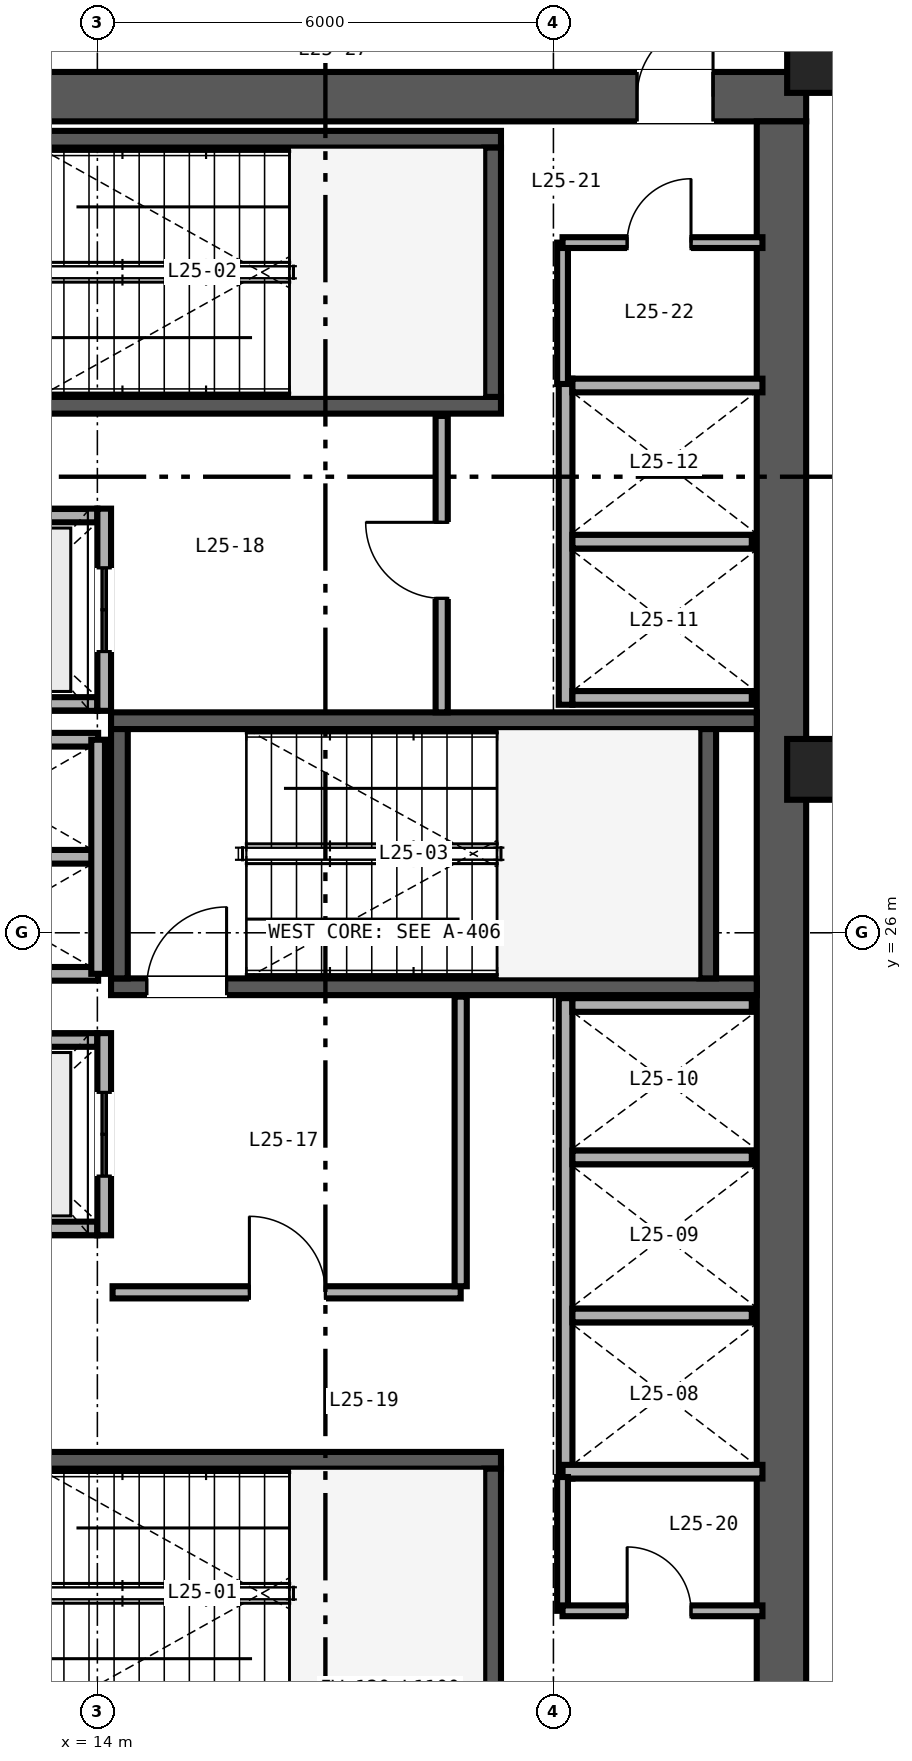
"""IFC4 building model, lengths in metres.
Left out: names, types, materials, properties, quantities, classifications, styles, units other than length and angle.
Written with IfcOpenShell. Run it as: python <this file> out.ifc"""

import sys

from ifc_helpers import new_model, si_unit, direction, frame, frame_2d, origin, origin_2d, place, context, subcontext, project, spatial, rectangle, hollow_rectangle, extrude, source, transform, mapped, element, fill, save


model = new_model("IFC4")
c1 = context("Model", 3, precision=1e-05, world=origin(), true_north=direction((0.0, 1.0)))
c2 = subcontext(c1, "Body", "Model", "MODEL_VIEW")
j1 = project(units=[si_unit("LENGTHUNIT", "METRE"), si_unit("PLANEANGLEUNIT", "RADIAN")], contexts=[c1])
p1 = place(None, origin())
s1 = spatial("IfcSite", under=j1, at=p1, CompositionType="ELEMENT")
p2 = place(p1, origin())
s2 = spatial("IfcBuilding", under=s1, at=p2, CompositionType="ELEMENT")
p3 = place(p2, frame((0.0, 0.0, 104.4)))
s3 = spatial("IfcBuildingStorey", under=s2, at=p3, CompositionType="ELEMENT", Elevation=104.4)
p4 = place(p3, frame((10.675, 37.0, 0.0), z_axis=(0.0, 0.0, 1.0), x_axis=(1.0, 0.0, 0.0)))
e1 = element("IfcWall", 1, at=p4, inside=s3, PredefinedType="SHEAR", context=c2, shape_type="SweptSolid", body=[
    extrude(rectangle(XDim=12.65, YDim=0.65, at=frame_2d((6.325, 0.0))), origin(), (0.0, 0.0, 1.0), 3.36),
])
p5 = place(p4, frame((10.425, 0.0, 0.0)))
e2 = element("IfcOpeningElement", 2, at=p5, cuts=e1, PredefinedType="OPENING", context=c2, shape_type="SweptSolid", body=[
    extrude(rectangle(XDim=1.0, YDim=2.15, at=frame_2d((0.5, 1.075))), frame((0.0, 0.335, 0.0), z_axis=(0.0, -1.0, 0.0), x_axis=(1.0, 0.0, 0.0)), (0.0, 0.0, 1.0), 0.67),
])
p6 = place(p3, frame((23.0, 15.325, 0.0), z_axis=(0.0, 0.0, 1.0), x_axis=(0.0, 1.0, 0.0)))
e3 = element("IfcWall", 3, at=p6, inside=s3, PredefinedType="SHEAR", context=c2, shape_type="SweptSolid", body=[
    extrude(rectangle(XDim=21.35, YDim=0.65, at=frame_2d((10.675, 0.0))), origin(), (0.0, 0.0, 1.0), 3.36),
])
p7 = place(p3, frame((11.325, 19.06, 0.0), z_axis=(0.0, 0.0, 1.0), x_axis=(1.0, 0.0, 0.0)))
e4 = element("IfcWall", 4, at=p7, inside=s3, PredefinedType="SHEAR", context=c2, shape_type="SweptSolid", body=[
    extrude(rectangle(XDim=7.985, YDim=0.22, at=frame_2d((3.993, 0.0))), origin(), (0.0, 0.0, 1.0), 3.4),
])
p8 = place(p7, frame((0.595, 0.0, 0.0)))
e5 = element("IfcOpeningElement", 5, at=p8, cuts=e4, PredefinedType="OPENING", context=c2, shape_type="SweptSolid", body=[
    extrude(rectangle(XDim=1.05, YDim=2.15, at=frame_2d((0.525, 1.075))), frame((0.0, 0.12, 0.0), z_axis=(0.0, -1.0, 0.0), x_axis=(1.0, 0.0, 0.0)), (0.0, 0.0, 1.0), 0.24),
])
p9 = place(p3, frame((19.2, 15.67, 0.0), z_axis=(0.0, 0.0, 1.0), x_axis=(0.0, 1.0, 0.0)))
e6 = element("IfcWall", 6, at=p9, inside=s3, PredefinedType="SHEAR", context=c2, shape_type="SweptSolid", body=[
    extrude(rectangle(XDim=3.28, YDim=0.22, at=frame_2d((1.64, 0.0))), origin(), (0.0, 0.0, 1.0), 3.4),
])
p10 = place(p3, frame((11.325, 32.94, 0.0), z_axis=(0.0, 0.0, 1.0), x_axis=(1.0, 0.0, 0.0)))
e7 = element("IfcWall", 7, at=p10, inside=s3, PredefinedType="SHEAR", context=c2, shape_type="SweptSolid", body=[
    extrude(rectangle(XDim=7.985, YDim=0.22, at=frame_2d((3.993, 0.0))), origin(), (0.0, 0.0, 1.0), 3.4),
])
p11 = place(p10, frame((0.595, 0.0, 0.0)))
e8 = element("IfcOpeningElement", 8, at=p11, cuts=e7, PredefinedType="OPENING", context=c2, shape_type="SweptSolid", body=[
    extrude(rectangle(XDim=1.05, YDim=2.15, at=frame_2d((0.525, 1.075))), frame((0.0, 0.12, 0.0), z_axis=(0.0, -1.0, 0.0), x_axis=(1.0, 0.0, 0.0)), (0.0, 0.0, 1.0), 0.24),
])
p12 = place(p3, frame((11.325, 36.44, 0.0), z_axis=(0.0, 0.0, 1.0), x_axis=(1.0, 0.0, 0.0)))
e9 = element("IfcWall", 9, at=p12, inside=s3, PredefinedType="SHEAR", context=c2, shape_type="SweptSolid", body=[
    extrude(rectangle(XDim=7.985, YDim=0.22, at=frame_2d((3.993, 0.0))), origin(), (0.0, 0.0, 1.0), 3.4),
])
p13 = place(p3, frame((19.2, 33.05, 0.0), z_axis=(0.0, 0.0, 1.0), x_axis=(0.0, 1.0, 0.0)))
e10 = element("IfcWall", 10, at=p13, inside=s3, PredefinedType="SHEAR", context=c2, shape_type="SweptSolid", body=[
    extrude(rectangle(XDim=3.28, YDim=0.22, at=frame_2d((1.64, 0.0))), origin(), (0.0, 0.0, 1.0), 3.4),
])
p14 = place(p3, frame((14.18, 25.29, 0.0), z_axis=(0.0, 0.0, 1.0), x_axis=(1.0, 0.0, 0.0)))
e11 = element("IfcWall", 11, at=p14, inside=s3, PredefinedType="SHEAR", context=c2, shape_type="SweptSolid", body=[
    extrude(rectangle(XDim=8.495, YDim=0.22, at=frame_2d((4.248, 0.0))), origin(), (0.0, 0.0, 1.0), 3.4),
])
p15 = place(p14, frame((0.47, 0.0, 0.0)))
e12 = element("IfcOpeningElement", 12, at=p15, cuts=e11, PredefinedType="OPENING", context=c2, shape_type="SweptSolid", body=[
    extrude(rectangle(XDim=1.05, YDim=2.15, at=frame_2d((0.525, 1.075))), frame((0.0, 0.12, 0.0), z_axis=(0.0, -1.0, 0.0), x_axis=(1.0, 0.0, 0.0)), (0.0, 0.0, 1.0), 0.24),
])
p16 = place(p3, frame((14.18, 28.79, 0.0), z_axis=(0.0, 0.0, 1.0), x_axis=(1.0, 0.0, 0.0)))
e13 = element("IfcWall", 13, at=p16, inside=s3, PredefinedType="SHEAR", context=c2, shape_type="SweptSolid", body=[
    extrude(rectangle(XDim=8.495, YDim=0.22, at=frame_2d((4.248, 0.0))), origin(), (0.0, 0.0, 1.0), 3.4),
])
for number, where, z_axis, x_axis in (
    (14, (14.29, 25.4, 0.0), (0.0, 0.0, 1.0), (0.0, 1.0, 0.0)),
    (15, (22.03, 25.4, 0.0), (0.0, 0.0, 1.0), (0.0, 1.0, 0.0)),
):
    element("IfcWall", number, at=place(p3, frame(where, z_axis=z_axis, x_axis=x_axis)), inside=s3, PredefinedType="SHEAR", context=c2, shape_type="SweptSolid", body=[
        extrude(rectangle(XDim=3.28, YDim=0.22, at=frame_2d((1.64, 0.0))), origin(), (0.0, 0.0, 1.0), 3.4),
    ])
m1 = source(origin(), c2, "Body", "SweptSolid", [
    extrude(hollow_rectangle(XDim=0.85, YDim=0.8, WallThickness=0.032, at=origin_2d()), origin(), (0.0, 0.0, 1.0), 3.36),
])
for number, where, z_axis, x_axis in (
    (16, (23.5, 28.15, 0.0), (0.0, 0.0, 1.0), (1.0, 0.0, 0.0)),
    (17, (23.5, 37.45, 0.0), (0.0, 0.0, 1.0), (1.0, 0.0, 0.0)),
):
    element("IfcColumn", number, at=place(p3, frame(where, z_axis=z_axis, x_axis=x_axis)), inside=s3, PredefinedType="COLUMN", context=c2, shape_type="MappedRepresentation", body=[
        mapped(m1, transform((0.0, 0.0, 0.0), scale=1.0)),
    ])
p17 = place(p3, frame((20.16, 18.82, 0.0), z_axis=(0.0, 0.0, 1.0), x_axis=(0.0, 1.0, 0.0)))
e18 = element("IfcWall", 18, at=p17, inside=s3, PredefinedType="SOLIDWALL", context=c2, shape_type="SweptSolid", body=[
    extrude(rectangle(XDim=6.32, YDim=0.18, at=frame_2d((3.16, 0.0))), origin(), (0.0, 0.0, 1.0), 2.36),
])
p18 = place(p3, frame((20.12, 18.91, 0.0), z_axis=(0.0, 0.0, 1.0), x_axis=(1.0, 0.0, 0.0)))
e19 = element("IfcWall", 19, at=p18, inside=s3, PredefinedType="SOLIDWALL", context=c2, shape_type="SweptSolid", body=[
    extrude(rectangle(XDim=2.63, YDim=0.18, at=frame_2d((1.315, 0.0))), origin(), (0.0, 0.0, 1.0), 3.36),
])
p19 = place(p3, frame((20.25, 25.05, 0.0), z_axis=(0.0, 0.0, 1.0), x_axis=(1.0, 0.0, 0.0)))
e20 = element("IfcWall", 20, at=p19, inside=s3, PredefinedType="SOLIDWALL", context=c2, shape_type="SweptSolid", body=[
    extrude(rectangle(XDim=2.36, YDim=0.18, at=frame_2d((1.18, 0.0))), origin(), (0.0, 0.0, 1.0), 3.36),
])
p20 = place(p3, frame((20.25, 20.965, 0.0), z_axis=(0.0, 0.0, 1.0), x_axis=(1.0, 0.0, 0.0)))
e21 = element("IfcWall", 21, at=p20, inside=s3, PredefinedType="SOLIDWALL", context=c2, shape_type="SweptSolid", body=[
    extrude(rectangle(XDim=2.36, YDim=0.18, at=frame_2d((1.18, 0.0))), origin(), (0.0, 0.0, 1.0), 2.36),
])
p21 = place(p3, frame((20.25, 23.045, 0.0), z_axis=(0.0, 0.0, 1.0), x_axis=(1.0, 0.0, 0.0)))
e22 = element("IfcWall", 22, at=p21, inside=s3, PredefinedType="SOLIDWALL", context=c2, shape_type="SweptSolid", body=[
    extrude(rectangle(XDim=2.36, YDim=0.18, at=frame_2d((1.18, 0.0))), origin(), (0.0, 0.0, 1.0), 3.36),
])
p22 = place(p3, frame((20.16, 29.0, 0.0), z_axis=(0.0, 0.0, 1.0), x_axis=(0.0, 1.0, 0.0)))
e23 = element("IfcWall", 23, at=p22, inside=s3, PredefinedType="SOLIDWALL", context=c2, shape_type="SweptSolid", body=[
    extrude(rectangle(XDim=4.29, YDim=0.18, at=frame_2d((2.145, 0.0))), origin(), (0.0, 0.0, 1.0), 3.36),
])
p23 = place(p3, frame((20.25, 29.09, 0.0), z_axis=(0.0, 0.0, 1.0), x_axis=(1.0, 0.0, 0.0)))
e24 = element("IfcWall", 24, at=p23, inside=s3, PredefinedType="SOLIDWALL", context=c2, shape_type="SweptSolid", body=[
    extrude(rectangle(XDim=2.36, YDim=0.18, at=frame_2d((1.18, 0.0))), origin(), (0.0, 0.0, 1.0), 3.36),
])
p24 = place(p3, frame((20.25, 33.2, 0.0), z_axis=(0.0, 0.0, 1.0), x_axis=(1.0, 0.0, 0.0)))
e25 = element("IfcWall", 25, at=p24, inside=s3, PredefinedType="SOLIDWALL", context=c2, shape_type="SweptSolid", body=[
    extrude(rectangle(XDim=2.5, YDim=0.18, at=frame_2d((1.25, 0.0))), origin(), (0.0, 0.0, 1.0), 3.36),
])
p25 = place(p3, frame((20.25, 31.145, 0.0), z_axis=(0.0, 0.0, 1.0), x_axis=(1.0, 0.0, 0.0)))
e26 = element("IfcWall", 26, at=p25, inside=s3, PredefinedType="SOLIDWALL", context=c2, shape_type="SweptSolid", body=[
    extrude(rectangle(XDim=2.36, YDim=0.18, at=frame_2d((1.18, 0.0))), origin(), (0.0, 0.0, 1.0), 3.36),
])
for number, where, z_axis, x_axis in (
    (27, (11.5, 22.11, 0.0), (0.0, 0.0, 1.0), (1.0, 0.0, 0.0)),
    (28, (11.5, 24.59, 0.0), (0.0, 0.0, 1.0), (1.0, 0.0, 0.0)),
):
    element("IfcWall", number, at=place(p3, frame(where, z_axis=z_axis, x_axis=x_axis)), inside=s3, PredefinedType="SOLIDWALL", context=c2, shape_type="SweptSolid", body=[
        extrude(rectangle(XDim=2.5, YDim=0.18, at=frame_2d((1.25, 0.0))), origin(), (0.0, 0.0, 1.0), 3.36),
    ])
p26 = place(p3, frame((14.09, 22.02, 0.0), z_axis=(0.0, 0.0, 1.0), x_axis=(0.0, 1.0, 0.0)))
e29 = element("IfcWall", 29, at=p26, inside=s3, PredefinedType="SOLIDWALL", context=c2, shape_type="SweptSolid", body=[
    extrude(rectangle(XDim=2.66, YDim=0.18, at=frame_2d((1.33, 0.0))), origin(), (0.0, 0.0, 1.0), 3.36),
])
p27 = place(p26, frame((0.78, 0.0, 0.0)))
e30 = element("IfcOpeningElement", 30, at=p27, cuts=e29, PredefinedType="OPENING", context=c2, shape_type="SweptSolid", body=[
    extrude(rectangle(XDim=1.1, YDim=2.2, at=frame_2d((0.55, 1.1))), frame((0.0, 0.1, 0.0), z_axis=(0.0, -1.0, 0.0), x_axis=(1.0, 0.0, 0.0)), (0.0, 0.0, 1.0), 0.2),
])
for number, where, z_axis, x_axis in (
    (31, (11.5, 29.01, 0.0), (0.0, 0.0, 1.0), (1.0, 0.0, 0.0)),
    (32, (11.5, 31.49, 0.0), (0.0, 0.0, 1.0), (1.0, 0.0, 0.0)),
):
    element("IfcWall", number, at=place(p3, frame(where, z_axis=z_axis, x_axis=x_axis)), inside=s3, PredefinedType="SOLIDWALL", context=c2, shape_type="SweptSolid", body=[
        extrude(rectangle(XDim=2.5, YDim=0.18, at=frame_2d((1.25, 0.0))), origin(), (0.0, 0.0, 1.0), 3.36),
    ])
p28 = place(p3, frame((14.09, 28.92, 0.0), z_axis=(0.0, 0.0, 1.0), x_axis=(0.0, 1.0, 0.0)))
e33 = element("IfcWall", 33, at=p28, inside=s3, PredefinedType="SOLIDWALL", context=c2, shape_type="SweptSolid", body=[
    extrude(rectangle(XDim=2.66, YDim=0.18, at=frame_2d((1.33, 0.0))), origin(), (0.0, 0.0, 1.0), 3.36),
])
p29 = place(p28, frame((0.78, 0.0, 0.0)))
e34 = element("IfcOpeningElement", 34, at=p29, cuts=e33, PredefinedType="OPENING", context=c2, shape_type="SweptSolid", body=[
    extrude(rectangle(XDim=1.1, YDim=2.2, at=frame_2d((0.55, 1.1))), frame((0.0, 0.1, 0.0), z_axis=(0.0, -1.0, 0.0), x_axis=(1.0, 0.0, 0.0)), (0.0, 0.0, 1.0), 0.2),
])
for number, where, z_axis, x_axis in (
    (35, (11.5, 25.46, 0.0), (0.0, 0.0, 1.0), (1.0, 0.0, 0.0)),
    (36, (11.5, 27.0, 0.0), (0.0, 0.0, 1.0), (1.0, 0.0, 0.0)),
    (37, (11.5, 28.54, 0.0), (0.0, 0.0, 1.0), (1.0, 0.0, 0.0)),
):
    element("IfcWall", number, at=place(p3, frame(where, z_axis=z_axis, x_axis=x_axis)), inside=s3, PredefinedType="SOLIDWALL", context=c2, shape_type="SweptSolid", body=[
        extrude(rectangle(XDim=2.51, YDim=0.18, at=frame_2d((1.255, 0.0))), origin(), (0.0, 0.0, 1.0), 3.36),
    ])
p30 = place(p3, frame((14.01, 25.46, 0.0), z_axis=(0.0, 0.0, 1.0), x_axis=(0.0, 1.0, 0.0)))
e38 = element("IfcWall", 38, at=p30, inside=s3, PredefinedType="SOLIDWALL", context=c2, shape_type="SweptSolid", body=[
    extrude(rectangle(XDim=3.08, YDim=0.18, at=frame_2d((1.54, 0.0))), origin(), (0.0, 0.0, 1.0), 3.36),
])
p31 = place(p3, frame((14.2, 21.27, 0.0), z_axis=(0.0, 0.0, 1.0), x_axis=(1.0, 0.0, 0.0)))
e39 = element("IfcWall", 39, at=p31, inside=s3, PredefinedType="PARTITIONING", context=c2, shape_type="SweptSolid", body=[
    extrude(rectangle(XDim=4.58, YDim=0.16, at=frame_2d((2.29, 0.0))), origin(), (0.0, 0.0, 1.0), 3.36),
])
p32 = place(p31, frame((1.8, 0.0, 0.0)))
e40 = element("IfcOpeningElement", 40, at=p32, cuts=e39, PredefinedType="OPENING", context=c2, shape_type="SweptSolid", body=[
    extrude(rectangle(XDim=1.0, YDim=2.15, at=frame_2d((0.5, 1.075))), frame((0.0, 0.09, 0.0), z_axis=(0.0, -1.0, 0.0), x_axis=(1.0, 0.0, 0.0)), (0.0, 0.0, 1.0), 0.18),
])
p33 = place(p3, frame((18.78, 21.35, 0.0), z_axis=(0.0, 0.0, 1.0), x_axis=(0.0, 1.0, 0.0)))
e41 = element("IfcWall", 41, at=p33, inside=s3, PredefinedType="PARTITIONING", context=c2, shape_type="SweptSolid", body=[
    extrude(rectangle(XDim=3.81, YDim=0.16, at=frame_2d((1.905, 0.0))), origin(), (0.0, 0.0, 1.0), 3.36),
])
p34 = place(p3, frame((18.53, 28.9, 0.0), z_axis=(0.0, 0.0, 1.0), x_axis=(0.0, 1.0, 0.0)))
e42 = element("IfcWall", 42, at=p34, inside=s3, PredefinedType="PARTITIONING", context=c2, shape_type="SweptSolid", body=[
    extrude(rectangle(XDim=3.9, YDim=0.16, at=frame_2d((1.95, 0.0))), origin(), (0.0, 0.0, 1.0), 3.36),
])
p35 = place(p34, frame((1.5, 0.0, 0.0)))
e43 = element("IfcOpeningElement", 43, at=p35, cuts=e42, PredefinedType="OPENING", context=c2, shape_type="SweptSolid", body=[
    extrude(rectangle(XDim=1.0, YDim=2.15, at=frame_2d((0.5, 1.075))), frame((0.0, 0.09, 0.0), z_axis=(0.0, -1.0, 0.0), x_axis=(1.0, 0.0, 0.0)), (0.0, 0.0, 1.0), 0.18),
])
p36 = place(p3, frame((20.12, 17.08, 0.0), z_axis=(0.0, 0.0, 1.0), x_axis=(0.0, 1.0, 0.0)))
e44 = element("IfcWall", 44, at=p36, inside=s3, PredefinedType="PARTITIONING", context=c2, shape_type="SweptSolid", body=[
    extrude(rectangle(XDim=1.76, YDim=0.142, at=frame_2d((0.88, 0.0))), origin(), (0.0, 0.0, 1.0), 3.36),
])
p37 = place(p3, frame((20.12, 17.08, 0.0), z_axis=(0.0, 0.0, 1.0), x_axis=(1.0, 0.0, 0.0)))
e45 = element("IfcWall", 45, at=p37, inside=s3, PredefinedType="PARTITIONING", context=c2, shape_type="SweptSolid", body=[
    extrude(rectangle(XDim=2.63, YDim=0.142, at=frame_2d((1.315, 0.0))), origin(), (0.0, 0.0, 1.0), 3.36),
])
p38 = place(p37, frame((0.85, 0.0, 0.0)))
e46 = element("IfcOpeningElement", 46, at=p38, cuts=e45, PredefinedType="OPENING", context=c2, shape_type="SweptSolid", body=[
    extrude(rectangle(XDim=0.84, YDim=2.1, at=frame_2d((0.42, 1.05))), frame((0.0, 0.081, 0.0), z_axis=(0.0, -1.0, 0.0), x_axis=(1.0, 0.0, 0.0)), (0.0, 0.0, 1.0), 0.162),
])
p39 = place(p3, frame((20.12, 33.22, 0.0), z_axis=(0.0, 0.0, 1.0), x_axis=(0.0, 1.0, 0.0)))
e47 = element("IfcWall", 47, at=p39, inside=s3, PredefinedType="PARTITIONING", context=c2, shape_type="SweptSolid", body=[
    extrude(rectangle(XDim=1.86, YDim=0.142, at=frame_2d((0.93, 0.0))), origin(), (0.0, 0.0, 1.0), 3.36),
])
p40 = place(p3, frame((20.12, 35.08, 0.0), z_axis=(0.0, 0.0, 1.0), x_axis=(1.0, 0.0, 0.0)))
e48 = element("IfcWall", 48, at=p40, inside=s3, PredefinedType="PARTITIONING", context=c2, shape_type="SweptSolid", body=[
    extrude(rectangle(XDim=2.63, YDim=0.142, at=frame_2d((1.315, 0.0))), origin(), (0.0, 0.0, 1.0), 3.36),
])
p41 = place(p40, frame((0.85, 0.0, 0.0)))
e49 = element("IfcOpeningElement", 49, at=p41, cuts=e48, PredefinedType="OPENING", context=c2, shape_type="SweptSolid", body=[
    extrude(rectangle(XDim=0.84, YDim=2.1, at=frame_2d((0.42, 1.05))), frame((0.0, 0.081, 0.0), z_axis=(0.0, -1.0, 0.0), x_axis=(1.0, 0.0, 0.0)), (0.0, 0.0, 1.0), 0.162),
])
m2 = source(origin(), c2, "Body", "SweptSolid", [
    extrude(rectangle(XDim=1.05, YDim=2.15, at=frame_2d((0.525, 1.075))), frame((0.0, 0.025, 0.0), z_axis=(0.0, -1.0, 0.0), x_axis=(1.0, 0.0, 0.0)), (0.0, 0.0, 1.0), 0.05),
])
p42 = place(p15, origin())
e50 = element("IfcDoor", 50, at=p42, inside=s3, OperationType="SINGLE_SWING_RIGHT", PredefinedType="DOOR", context=c2, shape_type="MappedRepresentation", body=[
    mapped(m2, transform((0.0, 0.0, 0.0), scale=1.0)),
])
fill(e12, e50)
m3 = source(origin(), c2, "Body", "SweptSolid", [
    extrude(rectangle(XDim=1.1, YDim=2.2, at=frame_2d((0.55, 1.1))), frame((0.0, 0.025, 0.0), z_axis=(0.0, -1.0, 0.0), x_axis=(1.0, 0.0, 0.0)), (0.0, 0.0, 1.0), 0.05),
])
p43 = place(p27, origin())
e51 = element("IfcDoor", 51, at=p43, inside=s3, OperationType="DOUBLE_DOOR_SLIDING", PredefinedType="DOOR", context=c2, shape_type="MappedRepresentation", body=[
    mapped(m3, transform((0.0, 0.0, 0.0), scale=1.0)),
])
fill(e30, e51)
p44 = place(p29, origin())
e52 = element("IfcDoor", 52, at=p44, inside=s3, OperationType="DOUBLE_DOOR_SLIDING", PredefinedType="DOOR", context=c2, shape_type="MappedRepresentation", body=[
    mapped(m3, transform((0.0, 0.0, 0.0), scale=1.0)),
])
fill(e34, e52)
m4 = source(origin(), c2, "Body", "SweptSolid", [
    extrude(rectangle(XDim=1.0, YDim=2.15, at=frame_2d((0.5, 1.075))), frame((0.0, 0.025, 0.0), z_axis=(0.0, -1.0, 0.0), x_axis=(1.0, 0.0, 0.0)), (0.0, 0.0, 1.0), 0.05),
])
p45 = place(p32, origin())
e53 = element("IfcDoor", 53, at=p45, inside=s3, OperationType="SINGLE_SWING_LEFT", PredefinedType="DOOR", context=c2, shape_type="MappedRepresentation", body=[
    mapped(m4, transform((0.0, 0.0, 0.0), scale=1.0)),
])
fill(e40, e53)
p46 = place(p35, origin())
e54 = element("IfcDoor", 54, at=p46, inside=s3, OperationType="SINGLE_SWING_RIGHT", PredefinedType="DOOR", context=c2, shape_type="MappedRepresentation", body=[
    mapped(m4, transform((0.0, 0.0, 0.0), scale=1.0)),
])
fill(e43, e54)
m5 = source(origin(), c2, "Body", "SweptSolid", [
    extrude(rectangle(XDim=0.84, YDim=2.1, at=frame_2d((0.42, 1.05))), frame((0.0, 0.025, 0.0), z_axis=(0.0, -1.0, 0.0), x_axis=(1.0, 0.0, 0.0)), (0.0, 0.0, 1.0), 0.05),
])
p47 = place(p38, origin())
e55 = element("IfcDoor", 55, at=p47, inside=s3, OperationType="SINGLE_SWING_LEFT", PredefinedType="DOOR", context=c2, shape_type="MappedRepresentation", body=[
    mapped(m5, transform((0.0, 0.0, 0.0), scale=1.0)),
])
fill(e46, e55)
p48 = place(p41, origin())
e56 = element("IfcDoor", 56, at=p48, inside=s3, OperationType="SINGLE_SWING_RIGHT", PredefinedType="DOOR", context=c2, shape_type="MappedRepresentation", body=[
    mapped(m5, transform((0.0, 0.0, 0.0), scale=1.0)),
])
fill(e49, e56)
p49 = place(p5, origin())
e57 = element("IfcDoor", 57, at=p49, inside=s3, OperationType="SINGLE_SWING_RIGHT", PredefinedType="DOOR", context=c2, shape_type="MappedRepresentation", body=[
    mapped(m4, transform((0.0, 0.0, 0.0), scale=1.0)),
])
fill(e2, e57)
save(model, sys.argv[1])
